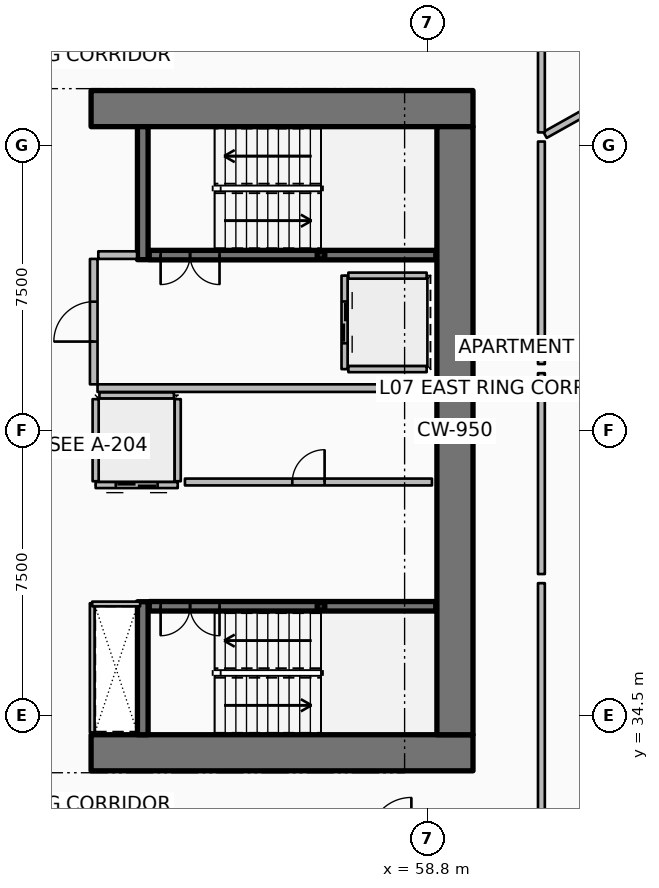
"""IFC4 building model, lengths in metres.
Left out: names, types, materials, properties, quantities, classifications, styles, units other than length and angle.
Written with IfcOpenShell. Run it as: python <this file> out.ifc"""

import sys

from ifc_helpers import new_model, si_unit, direction, frame, frame_2d, origin, origin_2d, place, context, subcontext, project, spatial, rectangle, hollow_rectangle, extrude, element, fill, save


model = new_model("IFC4")
c1 = context("Model", 3, precision=1e-05, world=origin(), true_north=direction((0.0, 1.0)))
c2 = subcontext(c1, "Body", "Model", "MODEL_VIEW")
j1 = project(units=[si_unit("LENGTHUNIT", "METRE"), si_unit("PLANEANGLEUNIT", "RADIAN")], contexts=[c1])
p1 = place(None, origin())
s1 = spatial("IfcSite", under=j1, at=p1, CompositionType="ELEMENT")
p2 = place(p1, origin())
s2 = spatial("IfcBuilding", under=s1, at=p2, CompositionType="ELEMENT")
p3 = place(p2, frame((0.0, 0.0, 33.9)))
s3 = spatial("IfcBuildingStorey", under=s2, at=p3, CompositionType="ELEMENT", Elevation=33.9)
for number, where, z_axis, x_axis in (
    (1, (49.95, 33.525, 0.0), (0.0, 0.0, 1.0), (1.0, 0.0, 0.0)),
    (2, (49.95, 50.475, 0.0), (0.0, 0.0, 1.0), (1.0, 0.0, 0.0)),
):
    element("IfcWall", number, at=place(p3, frame(where, z_axis=z_axis, x_axis=x_axis)), inside=s3, PredefinedType="SHEAR", context=c2, shape_type="SweptSolid", body=[
        extrude(rectangle(XDim=10.05, YDim=0.95, at=frame_2d((5.025, 0.0))), origin(), (0.0, 0.0, 1.0), 3.75),
    ])
p4 = place(p3, frame((59.525, 34.0, 0.0), z_axis=(0.0, 0.0, 1.0), x_axis=(0.0, 1.0, 0.0)))
e3 = element("IfcWall", 3, at=p4, inside=s3, PredefinedType="SHEAR", context=c2, shape_type="SweptSolid", body=[
    extrude(rectangle(XDim=16.0, YDim=0.95, at=frame_2d((8.0, 0.0))), origin(), (0.0, 0.0, 1.0), 3.75),
])
for number, where, z_axis, x_axis in (
    (4, (51.31, 46.5, 0.0), (0.0, 0.0, 1.0), (0.0, 1.0, 0.0)),
    (5, (51.31, 34.0, 0.0), (0.0, 0.0, 1.0), (0.0, 1.0, 0.0)),
):
    element("IfcWall", number, at=place(p3, frame(where, z_axis=z_axis, x_axis=x_axis)), inside=s3, PredefinedType="SHEAR", context=c2, shape_type="SweptSolid", body=[
        extrude(rectangle(XDim=3.5, YDim=0.28, at=frame_2d((1.75, 0.0))), origin(), (0.0, 0.0, 1.0), 3.75),
    ])
for number, where, z_axis, x_axis in (
    (6, (56.0, 46.62, 0.0), (0.0, 0.0, 1.0), (1.0, 0.0, 0.0)),
    (7, (56.0, 37.38, 0.0), (0.0, 0.0, 1.0), (1.0, 0.0, 0.0)),
):
    element("IfcColumn", number, at=place(p3, frame(where, z_axis=z_axis, x_axis=x_axis)), inside=s3, PredefinedType="COLUMN", context=c2, shape_type="SweptSolid", body=[
        extrude(hollow_rectangle(XDim=0.2, YDim=0.2, WallThickness=0.01, InnerFilletRadius=0.01, OuterFilletRadius=0.02, at=origin_2d()), origin(), (0.0, 0.0, 1.0), 1.67),
    ])
p5 = place(p3, frame((51.48, 46.62, 0.0), z_axis=(0.0, 0.0, 1.0), x_axis=(1.0, 0.0, 0.0)))
e8 = element("IfcWall", 8, at=p5, inside=s3, PredefinedType="SOLIDWALL", context=c2, shape_type="SweptSolid", body=[
    extrude(rectangle(XDim=7.54, YDim=0.25, at=frame_2d((3.77, 0.0))), origin(), (0.0, 0.0, 1.0), 3.5),
])
p6 = place(p5, frame((0.3, 0.0, 0.0)))
e9 = element("IfcOpeningElement", 9, at=p6, cuts=e8, PredefinedType="OPENING", context=c2, shape_type="SweptSolid", body=[
    extrude(rectangle(XDim=1.55, YDim=2.15, at=frame_2d((0.775, 1.075))), frame((0.0, 0.135, 0.0), z_axis=(0.0, -1.0, 0.0), x_axis=(1.0, 0.0, 0.0)), (0.0, 0.0, 1.0), 0.27),
])
p7 = place(p3, frame((51.48, 37.38, 0.0), z_axis=(0.0, 0.0, 1.0), x_axis=(1.0, 0.0, 0.0)))
e10 = element("IfcWall", 10, at=p7, inside=s3, PredefinedType="SOLIDWALL", context=c2, shape_type="SweptSolid", body=[
    extrude(rectangle(XDim=7.54, YDim=0.25, at=frame_2d((3.77, 0.0))), origin(), (0.0, 0.0, 1.0), 3.5),
])
p8 = place(p7, frame((0.3, 0.0, 0.0)))
e11 = element("IfcOpeningElement", 11, at=p8, cuts=e10, PredefinedType="OPENING", context=c2, shape_type="SweptSolid", body=[
    extrude(rectangle(XDim=1.55, YDim=2.15, at=frame_2d((0.775, 1.075))), frame((0.0, 0.135, 0.0), z_axis=(0.0, -1.0, 0.0), x_axis=(1.0, 0.0, 0.0)), (0.0, 0.0, 1.0), 0.27),
])
p9 = place(p3, frame((56.62, 46.08, 0.0), z_axis=(0.0, 0.0, 1.0), x_axis=(0.0, -1.0, 0.0)))
e12 = element("IfcWall", 12, at=p9, inside=s3, PredefinedType="PARTITIONING", context=c2, shape_type="SweptSolid", body=[
    extrude(rectangle(XDim=2.46, YDim=0.16, at=frame_2d((1.23, 0.0))), origin(), (0.0, 0.0, 1.0), 3.5),
])
p10 = place(p9, frame((0.68, 0.0, 0.0)))
e13 = element("IfcOpeningElement", 13, at=p10, cuts=e12, PredefinedType="OPENING", context=c2, shape_type="SweptSolid", body=[
    extrude(rectangle(XDim=1.1, YDim=2.1, at=frame_2d((0.55, 1.05))), frame((0.0, 0.09, 0.0), z_axis=(0.0, -1.0, 0.0), x_axis=(1.0, 0.0, 0.0)), (0.0, 0.0, 1.0), 0.18),
])
for number, where, z_axis, x_axis in (
    (14, (56.72, 46.08, 0.0), (0.0, 0.0, 1.0), (1.0, 0.0, 0.0)),
    (15, (56.72, 43.62, 0.0), (0.0, 0.0, 1.0), (1.0, 0.0, 0.0)),
):
    element("IfcWall", number, at=place(p3, frame(where, z_axis=z_axis, x_axis=x_axis)), inside=s3, PredefinedType="PARTITIONING", context=c2, shape_type="SweptSolid", body=[
        extrude(rectangle(XDim=2.06, YDim=0.16, at=frame_2d((1.03, 0.0))), origin(), (0.0, 0.0, 1.0), 3.5),
    ])
p11 = place(p3, frame((52.23, 40.57, 0.0), z_axis=(0.0, 0.0, 1.0), x_axis=(-1.0, 0.0, 0.0)))
e16 = element("IfcWall", 16, at=p11, inside=s3, PredefinedType="PARTITIONING", context=c2, shape_type="SweptSolid", body=[
    extrude(rectangle(XDim=2.16, YDim=0.16, at=frame_2d((1.08, 0.0))), origin(), (0.0, 0.0, 1.0), 3.5),
])
p12 = place(p11, frame((0.53, 0.0, 0.0)))
e17 = element("IfcOpeningElement", 17, at=p12, cuts=e16, PredefinedType="OPENING", context=c2, shape_type="SweptSolid", body=[
    extrude(rectangle(XDim=1.1, YDim=2.1, at=frame_2d((0.55, 1.05))), frame((0.0, 0.09, 0.0), z_axis=(0.0, -1.0, 0.0), x_axis=(1.0, 0.0, 0.0)), (0.0, 0.0, 1.0), 0.18),
])
for number, where, z_axis, x_axis in (
    (18, (52.23, 40.67, 0.0), (0.0, 0.0, 1.0), (0.0, 1.0, 0.0)),
    (19, (50.07, 40.67, 0.0), (0.0, 0.0, 1.0), (0.0, 1.0, 0.0)),
):
    element("IfcWall", number, at=place(p3, frame(where, z_axis=z_axis, x_axis=x_axis)), inside=s3, PredefinedType="PARTITIONING", context=c2, shape_type="SweptSolid", body=[
        extrude(rectangle(XDim=2.16, YDim=0.16, at=frame_2d((1.08, 0.0))), origin(), (0.0, 0.0, 1.0), 3.5),
    ])
p13 = place(p3, frame((50.17, 42.93, 0.0), z_axis=(0.0, 0.0, 1.0), x_axis=(1.0, 0.0, 0.0)))
e20 = element("IfcWall", 20, at=p13, inside=s3, PredefinedType="PARTITIONING", context=c2, shape_type="SweptSolid", body=[
    extrude(rectangle(XDim=1.96, YDim=0.16, at=frame_2d((0.98, 0.0))), origin(), (0.0, 0.0, 1.0), 3.5),
])
p14 = place(p3, frame((52.42, 40.65, 0.0), z_axis=(0.0, 0.0, 1.0), x_axis=(1.0, 0.0, 0.0)))
e21 = element("IfcWall", 21, at=p14, inside=s3, PredefinedType="PARTITIONING", context=c2, shape_type="SweptSolid", body=[
    extrude(rectangle(XDim=6.5, YDim=0.18, at=frame_2d((3.25, 0.0))), origin(), (0.0, 0.0, 1.0), 3.5),
])
p15 = place(p14, frame((2.825, 0.0, 0.0)))
e22 = element("IfcOpeningElement", 22, at=p15, cuts=e21, PredefinedType="OPENING", context=c2, shape_type="SweptSolid", body=[
    extrude(rectangle(XDim=0.85, YDim=2.06, at=frame_2d((0.425, 1.03))), frame((0.0, 0.1, 0.0), z_axis=(0.0, -1.0, 0.0), x_axis=(1.0, 0.0, 0.0)), (0.0, 0.0, 1.0), 0.2),
])
p16 = place(p3, frame((50.12, 43.12, 0.0), z_axis=(0.0, 0.0, 1.0), x_axis=(1.0, 0.0, 0.0)))
e23 = element("IfcWall", 23, at=p16, inside=s3, PredefinedType="PARTITIONING", context=c2, shape_type="SweptSolid", body=[
    extrude(rectangle(XDim=8.88, YDim=0.2, at=frame_2d((4.44, 0.0))), origin(), (0.0, 0.0, 1.0), 3.5),
])
p17 = place(p3, frame((50.14, 46.62, 0.0), z_axis=(0.0, 0.0, 1.0), x_axis=(1.0, 0.0, 0.0)))
e24 = element("IfcWall", 24, at=p17, inside=s3, PredefinedType="PARTITIONING", context=c2, shape_type="SweptSolid", body=[
    extrude(rectangle(XDim=1.02, YDim=0.2, at=frame_2d((0.51, 0.0))), origin(), (0.0, 0.0, 1.0), 3.5),
])
p18 = place(p3, frame((50.02, 43.22, 0.0), z_axis=(0.0, 0.0, 1.0), x_axis=(0.0, 1.0, 0.0)))
e25 = element("IfcWall", 25, at=p18, inside=s3, PredefinedType="PARTITIONING", context=c2, shape_type="SweptSolid", body=[
    extrude(rectangle(XDim=3.3, YDim=0.2, at=frame_2d((1.65, 0.0))), origin(), (0.0, 0.0, 1.0), 3.5),
])
p19 = place(p18, frame((1.125, 0.0, 0.0)))
e26 = element("IfcOpeningElement", 26, at=p19, cuts=e25, PredefinedType="OPENING", context=c2, shape_type="SweptSolid", body=[
    extrude(rectangle(XDim=1.05, YDim=2.1, at=frame_2d((0.525, 1.05))), frame((0.0, 0.11, 0.0), z_axis=(0.0, -1.0, 0.0), x_axis=(1.0, 0.0, 0.0)), (0.0, 0.0, 1.0), 0.22),
])
p20 = place(p3, frame((49.98, 34.06, 0.0), z_axis=(0.0, 0.0, 1.0), x_axis=(0.0, 1.0, 0.0)))
e27 = element("IfcWall", 27, at=p20, inside=s3, PredefinedType="PARTITIONING", context=c2, shape_type="SweptSolid", body=[
    extrude(rectangle(XDim=3.4, YDim=0.125, at=frame_2d((1.7, 0.0))), origin(), (0.0, 0.0, 1.0), 2.94),
])
p21 = place(p3, frame((49.98, 37.44, 0.0), z_axis=(0.0, 0.0, 1.0), x_axis=(1.0, 0.0, 0.0)))
e28 = element("IfcWall", 28, at=p21, inside=s3, PredefinedType="PARTITIONING", context=c2, shape_type="SweptSolid", body=[
    extrude(rectangle(XDim=1.26, YDim=0.125, at=frame_2d((0.63, 0.0))), origin(), (0.0, 0.0, 1.0), 2.94),
])
p22 = place(p3, frame((61.896, 49.782, 0.0), z_axis=(0.0, 0.0, 1.0), x_axis=(0.872493215695, 0.488626225828, 0.0)))
e29 = element("IfcWall", 29, at=p22, inside=s3, PredefinedType="PARTITIONING", context=c2, shape_type="SweptSolid", body=[
    extrude(rectangle(XDim=15.612, YDim=0.18, at=frame_2d((7.806, 0.0))), origin(), (0.0, 0.0, 1.0), 2.867),
])
p23 = place(p3, frame((61.8, 49.848, 0.0), z_axis=(0.0, 0.0, 1.0), x_axis=(0.0, 1.0, 0.0)))
e30 = element("IfcWall", 30, at=p23, inside=s3, PredefinedType="PARTITIONING", context=c2, shape_type="SweptSolid", body=[
    extrude(rectangle(XDim=2.781, YDim=0.18, at=frame_2d((1.391, 0.0))), origin(), (0.0, 0.0, 1.0), 2.867),
])
p24 = place(p3, frame((61.8, 31.37, 0.0), z_axis=(0.0, 0.0, 1.0), x_axis=(0.0, 1.0, 0.0)))
e31 = element("IfcWall", 31, at=p24, inside=s3, PredefinedType="PARTITIONING", context=c2, shape_type="SweptSolid", body=[
    extrude(rectangle(XDim=6.618, YDim=0.18, at=frame_2d((3.309, 0.0))), origin(), (0.0, 0.0, 1.0), 2.867),
])
p25 = place(p3, frame((61.8, 38.228, 0.0), z_axis=(0.0, 0.0, 1.0), x_axis=(0.0, 1.0, 0.0)))
e32 = element("IfcWall", 32, at=p25, inside=s3, PredefinedType="PARTITIONING", context=c2, shape_type="SweptSolid", body=[
    extrude(rectangle(XDim=5.285, YDim=0.18, at=frame_2d((2.643, 0.0))), origin(), (0.0, 0.0, 1.0), 2.867),
])
p26 = place(p3, frame((61.8, 43.753, 0.0), z_axis=(0.0, 0.0, 1.0), x_axis=(0.0, 1.0, 0.0)))
e33 = element("IfcWall", 33, at=p26, inside=s3, PredefinedType="PARTITIONING", context=c2, shape_type="SweptSolid", body=[
    extrude(rectangle(XDim=5.855, YDim=0.18, at=frame_2d((2.927, 0.0))), origin(), (0.0, 0.0, 1.0), 2.867),
])
p27 = place(p6, origin())
e34 = element("IfcDoor", 34, at=p27, inside=s3, OperationType="DOUBLE_DOOR_SINGLE_SWING", PredefinedType="DOOR", context=c2, shape_type="SweptSolid", body=[
    extrude(rectangle(XDim=1.55, YDim=2.15, at=frame_2d((0.775, 1.075))), frame((0.0, 0.025, 0.0), z_axis=(0.0, -1.0, 0.0), x_axis=(1.0, 0.0, 0.0)), (0.0, 0.0, 1.0), 0.05),
])
fill(e9, e34)
p28 = place(p8, origin())
e35 = element("IfcDoor", 35, at=p28, inside=s3, OperationType="DOUBLE_DOOR_SINGLE_SWING", PredefinedType="DOOR", context=c2, shape_type="SweptSolid", body=[
    extrude(rectangle(XDim=1.55, YDim=2.15, at=frame_2d((0.775, 1.075))), frame((0.0, 0.025, 0.0), z_axis=(0.0, -1.0, 0.0), x_axis=(1.0, 0.0, 0.0)), (0.0, 0.0, 1.0), 0.05),
])
fill(e11, e35)
p29 = place(p10, origin())
e36 = element("IfcDoor", 36, at=p29, inside=s3, OperationType="DOUBLE_DOOR_SLIDING", PredefinedType="DOOR", context=c2, shape_type="SweptSolid", body=[
    extrude(rectangle(XDim=1.1, YDim=2.1, at=frame_2d((0.55, 1.05))), frame((0.0, 0.025, 0.0), z_axis=(0.0, -1.0, 0.0), x_axis=(1.0, 0.0, 0.0)), (0.0, 0.0, 1.0), 0.05),
])
fill(e13, e36)
p30 = place(p12, origin())
e37 = element("IfcDoor", 37, at=p30, inside=s3, OperationType="DOUBLE_DOOR_SLIDING", PredefinedType="DOOR", context=c2, shape_type="SweptSolid", body=[
    extrude(rectangle(XDim=1.1, YDim=2.1, at=frame_2d((0.55, 1.05))), frame((0.0, 0.025, 0.0), z_axis=(0.0, -1.0, 0.0), x_axis=(1.0, 0.0, 0.0)), (0.0, 0.0, 1.0), 0.05),
])
fill(e17, e37)
p31 = place(p15, origin())
e38 = element("IfcDoor", 38, at=p31, inside=s3, OperationType="SINGLE_SWING_RIGHT", PredefinedType="DOOR", context=c2, shape_type="SweptSolid", body=[
    extrude(rectangle(XDim=0.85, YDim=2.06, at=frame_2d((0.425, 1.03))), frame((0.0, 0.025, 0.0), z_axis=(0.0, -1.0, 0.0), x_axis=(1.0, 0.0, 0.0)), (0.0, 0.0, 1.0), 0.05),
])
fill(e22, e38)
p32 = place(p19, origin())
e39 = element("IfcDoor", 39, at=p32, inside=s3, OperationType="SINGLE_SWING_LEFT", PredefinedType="DOOR", context=c2, shape_type="SweptSolid", body=[
    extrude(rectangle(XDim=1.05, YDim=2.1, at=frame_2d((0.525, 1.05))), frame((0.0, 0.025, 0.0), z_axis=(0.0, -1.0, 0.0), x_axis=(1.0, 0.0, 0.0)), (0.0, 0.0, 1.0), 0.05),
])
fill(e26, e39)
save(model, sys.argv[1])
